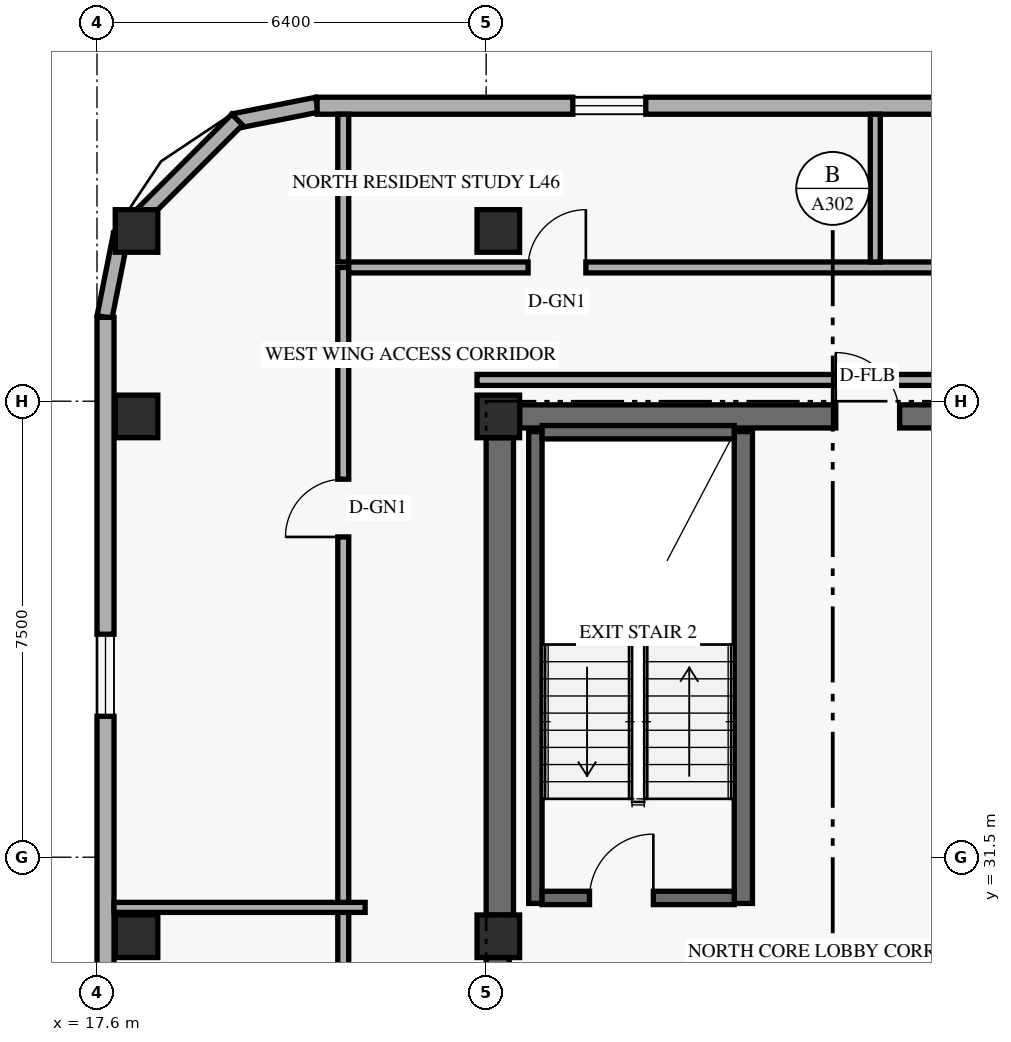
"""IFC4 building model, lengths in metres.
Left out: names, types, materials, properties, quantities, classifications, styles, units other than length and angle.
Written with IfcOpenShell. Run it as: python <this file> out.ifc"""

import sys

from ifc_helpers import new_model, si_unit, direction, frame, frame_2d, origin, origin_2d, place, context, subcontext, project, spatial, rectangle, extrude, element, fill, save


model = new_model("IFC4")
c1 = context("Model", 3, precision=1e-05, world=origin(), true_north=direction((0.0, 1.0)))
c2 = subcontext(c1, "Body", "Model", "MODEL_VIEW")
j1 = project(units=[si_unit("LENGTHUNIT", "METRE"), si_unit("PLANEANGLEUNIT", "RADIAN")], contexts=[c1])
p1 = place(None, origin())
s1 = spatial("IfcSite", under=j1, at=p1, CompositionType="ELEMENT")
p2 = place(p1, origin())
s2 = spatial("IfcBuilding", under=s1, at=p2, CompositionType="ELEMENT")
p3 = place(p2, frame((0.0, 0.0, 177.6)))
s3 = spatial("IfcBuildingStorey", under=s2, at=p3, CompositionType="ELEMENT", Elevation=177.6)
p4 = place(p3, frame((24.19, 17.9, 0.0), z_axis=(0.0, 0.0, 1.0), x_axis=(0.0, 1.0, 0.0)))
e1 = element("IfcWall", 1, at=p4, inside=s3, PredefinedType="SHEAR", context=c2, shape_type="SweptSolid", body=[
    extrude(rectangle(XDim=11.95, YDim=0.38, at=frame_2d((5.975, 0.0))), origin(), (0.0, 0.0, 1.0), 2.748),
])
p5 = place(p3, frame((24.225, 30.55, 0.0), z_axis=(0.0, 0.0, 1.0), x_axis=(0.0, 1.0, 0.0)))
e2 = element("IfcWall", 2, at=p5, inside=s3, PredefinedType="SHEAR", context=c2, shape_type="SweptSolid", body=[
    extrude(rectangle(XDim=7.85, YDim=0.45, at=frame_2d((3.925, 0.0))), origin(), (0.0, 0.0, 1.0), 2.748),
])
p6 = place(p3, frame((24.55, 38.75, 0.0), z_axis=(0.0, 0.0, 1.0), x_axis=(1.0, 0.0, 0.0)))
e3 = element("IfcWall", 3, at=p6, inside=s3, PredefinedType="SHEAR", context=c2, shape_type="SweptSolid", body=[
    extrude(rectangle(XDim=10.3, YDim=0.38, at=frame_2d((5.15, 0.0))), origin(), (0.0, 0.0, 1.0), 3.36),
])
p7 = place(p6, frame((5.2, 0.0, 0.0)))
e4 = element("IfcOpeningElement", 4, at=p7, cuts=e3, PredefinedType="OPENING", context=c2, shape_type="SweptSolid", body=[
    extrude(rectangle(XDim=1.05, YDim=2.15, at=frame_2d((0.525, 1.075))), frame((0.0, 0.2, 0.0), z_axis=(0.0, -1.0, 0.0), x_axis=(1.0, 0.0, 0.0)), (0.0, 0.0, 1.0), 0.4),
])
p8 = place(p3, frame((24.81, 30.74, 0.0), z_axis=(0.0, 0.0, 1.0), x_axis=(0.0, 1.0, 0.0)))
e5 = element("IfcWall", 5, at=p8, inside=s3, PredefinedType="SHEAR", context=c2, shape_type="SweptSolid", body=[
    extrude(rectangle(XDim=7.76, YDim=0.22, at=frame_2d((3.88, 0.0))), origin(), (0.0, 0.0, 1.0), 3.36),
])
p9 = place(p3, frame((28.23, 30.74, 0.0), z_axis=(0.0, 0.0, 1.0), x_axis=(0.0, 1.0, 0.0)))
e6 = element("IfcWall", 6, at=p9, inside=s3, PredefinedType="SHEAR", context=c2, shape_type="SweptSolid", body=[
    extrude(rectangle(XDim=7.76, YDim=0.3, at=frame_2d((3.88, 0.0))), origin(), (0.0, 0.0, 1.0), 3.36),
])
p10 = place(p3, frame((24.92, 30.83, 0.0), z_axis=(0.0, 0.0, 1.0), x_axis=(1.0, 0.0, 0.0)))
e7 = element("IfcWall", 7, at=p10, inside=s3, PredefinedType="SHEAR", context=c2, shape_type="SweptSolid", body=[
    extrude(rectangle(XDim=3.16, YDim=0.22, at=frame_2d((1.58, 0.0))), origin(), (0.0, 0.0, 1.0), 3.36),
])
p11 = place(p10, frame((0.78, 0.0, 0.0)))
e8 = element("IfcOpeningElement", 8, at=p11, cuts=e7, PredefinedType="OPENING", context=c2, shape_type="SweptSolid", body=[
    extrude(rectangle(XDim=1.05, YDim=2.15, at=frame_2d((0.525, 1.075))), frame((0.0, 0.12, 0.0), z_axis=(0.0, -1.0, 0.0), x_axis=(1.0, 0.0, 0.0)), (0.0, 0.0, 1.0), 0.24),
])
p12 = place(p3, frame((24.92, 38.49, 0.0), z_axis=(0.0, 0.0, 1.0), x_axis=(1.0, 0.0, 0.0)))
e9 = element("IfcWall", 9, at=p12, inside=s3, PredefinedType="SHEAR", context=c2, shape_type="SweptSolid", body=[
    extrude(rectangle(XDim=3.16, YDim=0.22, at=frame_2d((1.58, 0.0))), origin(), (0.0, 0.0, 1.0), 3.36),
])
for number, where, z_axis, x_axis in (
    (10, (18.25, 30.2, 0.0), (0.0, 0.0, 1.0), (1.0, 0.0, 0.0)),
    (11, (18.25, 38.75, 0.0), (0.0, 0.0, 1.0), (1.0, 0.0, 0.0)),
    (12, (18.25, 41.8, 0.0), (0.0, 0.0, 1.0), (1.0, 0.0, 0.0)),
    (13, (24.2, 30.2, 0.0), (0.0, 0.0, 1.0), (1.0, 0.0, 0.0)),
    (14, (24.2, 38.75, 0.0), (0.0, 0.0, 1.0), (1.0, 0.0, 0.0)),
    (15, (24.2, 41.8, 0.0), (0.0, 0.0, 1.0), (1.0, 0.0, 0.0)),
):
    element("IfcColumn", number, at=place(p3, frame(where, z_axis=z_axis, x_axis=x_axis)), inside=s3, PredefinedType="COLUMN", context=c2, shape_type="SweptSolid", body=[
        extrude(rectangle(XDim=0.7, YDim=0.7, at=origin_2d()), origin(), (0.0, 0.0, 1.0), 3.6),
    ])
p13 = place(p3, frame((21.217, 43.876, 0.0), z_axis=(0.0, 0.0, 1.0), x_axis=(-0.980809899341, -0.19496651342, 0.0)))
e16 = element("IfcWall", 16, at=p13, inside=s3, PredefinedType="SOLIDWALL", context=c2, shape_type="SweptSolid", body=[
    extrude(rectangle(XDim=1.389, YDim=0.25, at=frame_2d((0.694, 0.0))), origin(), (0.0, 0.0, 1.0), 3.36),
])
p14 = place(p3, frame((19.905, 43.632, 0.0), z_axis=(0.0, 0.0, 1.0), x_axis=(-0.707106781187, -0.707106781187, 0.0)))
e17 = element("IfcWall", 17, at=p14, inside=s3, PredefinedType="SOLIDWALL", context=c2, shape_type="SweptSolid", body=[
    extrude(rectangle(XDim=2.739, YDim=0.25, at=frame_2d((1.37, 0.0))), origin(), (0.0, 0.0, 1.0), 3.36),
])
p15 = place(p3, frame((17.995, 41.746, 0.0), z_axis=(0.0, 0.0, 1.0), x_axis=(-0.195135625965, -0.9807762678, 0.0)))
e18 = element("IfcWall", 18, at=p15, inside=s3, PredefinedType="SOLIDWALL", context=c2, shape_type="SweptSolid", body=[
    extrude(rectangle(XDim=1.389, YDim=0.25, at=frame_2d((0.694, 0.0))), origin(), (0.0, 0.0, 1.0), 3.36),
])
p16 = place(p3, frame((54.98, 43.86, 0.0), z_axis=(0.0, 0.0, 1.0), x_axis=(-1.0, 0.0, 0.0)))
e19 = element("IfcWall", 19, at=p16, inside=s3, PredefinedType="SOLIDWALL", context=c2, shape_type="SweptSolid", body=[
    extrude(rectangle(XDim=33.76, YDim=0.28, at=frame_2d((16.88, 0.0))), origin(), (0.0, 0.0, 1.0), 3.36),
])
p17 = place(p16, frame((28.355, 0.0, 0.85)))
e20 = element("IfcOpeningElement", 20, at=p17, cuts=e19, PredefinedType="OPENING", context=c2, shape_type="SweptSolid", body=[
    extrude(rectangle(XDim=1.2, YDim=1.5, at=frame_2d((0.6, 0.75))), frame((0.0, 0.15, 0.0), z_axis=(0.0, -1.0, 0.0), x_axis=(1.0, 0.0, 0.0)), (0.0, 0.0, 1.0), 0.3),
])
p18 = place(p16, frame((21.47, 0.0, 0.85)))
e21 = element("IfcOpeningElement", 21, at=p18, cuts=e19, PredefinedType="OPENING", context=c2, shape_type="SweptSolid", body=[
    extrude(rectangle(XDim=1.2, YDim=1.5, at=frame_2d((0.6, 0.75))), frame((0.0, 0.15, 0.0), z_axis=(0.0, -1.0, 0.0), x_axis=(1.0, 0.0, 0.0)), (0.0, 0.0, 1.0), 0.3),
])
p19 = place(p16, frame((17.74, 0.0, 0.85)))
e22 = element("IfcOpeningElement", 22, at=p19, cuts=e19, PredefinedType="OPENING", context=c2, shape_type="SweptSolid", body=[
    extrude(rectangle(XDim=1.2, YDim=1.5, at=frame_2d((0.6, 0.75))), frame((0.0, 0.15, 0.0), z_axis=(0.0, -1.0, 0.0), x_axis=(1.0, 0.0, 0.0)), (0.0, 0.0, 1.0), 0.3),
])
p20 = place(p16, frame((13.62, 0.0, 0.85)))
e23 = element("IfcOpeningElement", 23, at=p20, cuts=e19, PredefinedType="OPENING", context=c2, shape_type="SweptSolid", body=[
    extrude(rectangle(XDim=1.2, YDim=1.5, at=frame_2d((0.6, 0.75))), frame((0.0, 0.15, 0.0), z_axis=(0.0, -1.0, 0.0), x_axis=(1.0, 0.0, 0.0)), (0.0, 0.0, 1.0), 0.3),
])
p21 = place(p16, frame((8.65, 0.0, 0.85)))
e24 = element("IfcOpeningElement", 24, at=p21, cuts=e19, PredefinedType="OPENING", context=c2, shape_type="SweptSolid", body=[
    extrude(rectangle(XDim=1.2, YDim=1.5, at=frame_2d((0.6, 0.75))), frame((0.0, 0.15, 0.0), z_axis=(0.0, -1.0, 0.0), x_axis=(1.0, 0.0, 0.0)), (0.0, 0.0, 1.0), 0.3),
])
p22 = place(p16, frame((5.68, 0.0, 0.85)))
e25 = element("IfcOpeningElement", 25, at=p22, cuts=e19, PredefinedType="OPENING", context=c2, shape_type="SweptSolid", body=[
    extrude(rectangle(XDim=1.2, YDim=1.5, at=frame_2d((0.6, 0.75))), frame((0.0, 0.15, 0.0), z_axis=(0.0, -1.0, 0.0), x_axis=(1.0, 0.0, 0.0)), (0.0, 0.0, 1.0), 0.3),
])
p23 = place(p16, frame((2.09, 0.0, 0.85)))
e26 = element("IfcOpeningElement", 26, at=p23, cuts=e19, PredefinedType="OPENING", context=c2, shape_type="SweptSolid", body=[
    extrude(rectangle(XDim=1.2, YDim=1.5, at=frame_2d((0.6, 0.75))), frame((0.0, 0.15, 0.0), z_axis=(0.0, -1.0, 0.0), x_axis=(1.0, 0.0, 0.0)), (0.0, 0.0, 1.0), 0.3),
])
p24 = place(p3, frame((17.74, 40.38, 0.0), z_axis=(0.0, 0.0, 1.0), x_axis=(0.0, -1.0, 0.0)))
e27 = element("IfcWall", 27, at=p24, inside=s3, PredefinedType="SOLIDWALL", context=c2, shape_type="SweptSolid", body=[
    extrude(rectangle(XDim=32.76, YDim=0.28, at=frame_2d((16.38, 0.0))), origin(), (0.0, 0.0, 1.0), 3.36),
])
p25 = place(p24, frame((28.998, 0.0, 0.85)))
e28 = element("IfcOpeningElement", 28, at=p25, cuts=e27, PredefinedType="OPENING", context=c2, shape_type="SweptSolid", body=[
    extrude(rectangle(XDim=1.35, YDim=1.55, at=frame_2d((0.675, 0.775))), frame((0.0, 0.15, 0.0), z_axis=(0.0, -1.0, 0.0), x_axis=(1.0, 0.0, 0.0)), (0.0, 0.0, 1.0), 0.3),
])
p26 = place(p24, frame((25.288, 0.0, 0.85)))
e29 = element("IfcOpeningElement", 29, at=p26, cuts=e27, PredefinedType="OPENING", context=c2, shape_type="SweptSolid", body=[
    extrude(rectangle(XDim=1.35, YDim=1.55, at=frame_2d((0.675, 0.775))), frame((0.0, 0.15, 0.0), z_axis=(0.0, -1.0, 0.0), x_axis=(1.0, 0.0, 0.0)), (0.0, 0.0, 1.0), 0.3),
])
p27 = place(p24, frame((15.625, 0.0, 0.85)))
e30 = element("IfcOpeningElement", 30, at=p27, cuts=e27, PredefinedType="OPENING", context=c2, shape_type="SweptSolid", body=[
    extrude(rectangle(XDim=1.35, YDim=1.55, at=frame_2d((0.675, 0.775))), frame((0.0, 0.15, 0.0), z_axis=(0.0, -1.0, 0.0), x_axis=(1.0, 0.0, 0.0)), (0.0, 0.0, 1.0), 0.3),
])
p28 = place(p24, frame((5.212, 0.0, 0.85)))
e31 = element("IfcOpeningElement", 31, at=p28, cuts=e27, PredefinedType="OPENING", context=c2, shape_type="SweptSolid", body=[
    extrude(rectangle(XDim=1.35, YDim=1.55, at=frame_2d((0.675, 0.775))), frame((0.0, 0.15, 0.0), z_axis=(0.0, -1.0, 0.0), x_axis=(1.0, 0.0, 0.0)), (0.0, 0.0, 1.0), 0.3),
])
p29 = place(p3, frame((21.65, 6.8, 0.0), z_axis=(0.0, 0.0, 1.0), x_axis=(0.0, 1.0, 0.0)))
e32 = element("IfcWall", 32, at=p29, inside=s3, PredefinedType="STANDARD", context=c2, shape_type="SweptSolid", body=[
    extrude(rectangle(XDim=34.4, YDim=0.18, at=frame_2d((17.2, 0.0))), origin(), (0.0, 0.0, 1.0), 2.73),
])
p30 = place(p29, frame((0.732, 0.0, 0.0)))
e33 = element("IfcOpeningElement", 33, at=p30, cuts=e32, PredefinedType="OPENING", context=c2, shape_type="SweptSolid", body=[
    extrude(rectangle(XDim=0.95, YDim=2.15, at=frame_2d((0.475, 1.075))), frame((0.0, 0.1, 0.0), z_axis=(0.0, -1.0, 0.0), x_axis=(1.0, 0.0, 0.0)), (0.0, 0.0, 1.0), 0.2),
])
p31 = place(p29, frame((7.768, 0.0, 0.0)))
e34 = element("IfcOpeningElement", 34, at=p31, cuts=e32, PredefinedType="OPENING", context=c2, shape_type="SweptSolid", body=[
    extrude(rectangle(XDim=0.95, YDim=2.15, at=frame_2d((0.475, 1.075))), frame((0.0, 0.1, 0.0), z_axis=(0.0, -1.0, 0.0), x_axis=(1.0, 0.0, 0.0)), (0.0, 0.0, 1.0), 0.2),
])
p32 = place(p29, frame((17.333, 0.0, 0.0)))
e35 = element("IfcOpeningElement", 35, at=p32, cuts=e32, PredefinedType="OPENING", context=c2, shape_type="SweptSolid", body=[
    extrude(rectangle(XDim=0.95, YDim=2.15, at=frame_2d((0.475, 1.075))), frame((0.0, 0.1, 0.0), z_axis=(0.0, -1.0, 0.0), x_axis=(1.0, 0.0, 0.0)), (0.0, 0.0, 1.0), 0.2),
])
p33 = place(p29, frame((29.968, 0.0, 0.0)))
e36 = element("IfcOpeningElement", 36, at=p33, cuts=e32, PredefinedType="OPENING", context=c2, shape_type="SweptSolid", body=[
    extrude(rectangle(XDim=0.95, YDim=2.15, at=frame_2d((0.475, 1.075))), frame((0.0, 0.1, 0.0), z_axis=(0.0, -1.0, 0.0), x_axis=(1.0, 0.0, 0.0)), (0.0, 0.0, 1.0), 0.2),
])
p34 = place(p3, frame((21.74, 41.2, 0.0), z_axis=(0.0, 0.0, 1.0), x_axis=(1.0, 0.0, 0.0)))
e37 = element("IfcWall", 37, at=p34, inside=s3, PredefinedType="STANDARD", context=c2, shape_type="SweptSolid", body=[
    extrude(rectangle(XDim=13.68, YDim=0.18, at=frame_2d((6.84, 0.0))), origin(), (0.0, 0.0, 1.0), 2.73),
])
p35 = place(p34, frame((2.95, 0.0, 0.0)))
e38 = element("IfcOpeningElement", 38, at=p35, cuts=e37, PredefinedType="OPENING", context=c2, shape_type="SweptSolid", body=[
    extrude(rectangle(XDim=0.95, YDim=2.15, at=frame_2d((0.475, 1.075))), frame((0.0, 0.1, 0.0), z_axis=(0.0, -1.0, 0.0), x_axis=(1.0, 0.0, 0.0)), (0.0, 0.0, 1.0), 0.2),
])
p36 = place(p34, frame((10.11, 0.0, 0.0)))
e39 = element("IfcOpeningElement", 39, at=p36, cuts=e37, PredefinedType="OPENING", context=c2, shape_type="SweptSolid", body=[
    extrude(rectangle(XDim=0.95, YDim=2.15, at=frame_2d((0.475, 1.075))), frame((0.0, 0.1, 0.0), z_axis=(0.0, -1.0, 0.0), x_axis=(1.0, 0.0, 0.0)), (0.0, 0.0, 1.0), 0.2),
])
p37 = place(p3, frame((23.85, 39.35, 0.0), z_axis=(0.0, 0.0, 1.0), x_axis=(1.0, 0.0, 0.0)))
e40 = element("IfcWall", 40, at=p37, inside=s3, PredefinedType="STANDARD", context=c2, shape_type="SweptSolid", body=[
    extrude(rectangle(XDim=11.57, YDim=0.18, at=frame_2d((5.785, 0.0))), origin(), (0.0, 0.0, 1.0), 2.73),
])
p38 = place(p3, frame((21.65, 41.29, 0.0), z_axis=(0.0, 0.0, 1.0), x_axis=(0.0, 1.0, 0.0)))
e41 = element("IfcWall", 41, at=p38, inside=s3, PredefinedType="PARTITIONING", context=c2, shape_type="SweptSolid", body=[
    extrude(rectangle(XDim=2.43, YDim=0.18, at=frame_2d((1.215, 0.0))), origin(), (0.0, 0.0, 1.0), 2.879),
])
p39 = place(p3, frame((17.88, 30.675, 0.0), z_axis=(0.0, 0.0, 1.0), x_axis=(1.0, 0.0, 0.0)))
e42 = element("IfcWall", 42, at=p39, inside=s3, PredefinedType="PARTITIONING", context=c2, shape_type="SweptSolid", body=[
    extrude(rectangle(XDim=4.13, YDim=0.165, at=frame_2d((2.065, 0.0))), origin(), (0.0, 0.0, 1.0), 2.879),
])
p40 = place(p3, frame((30.4, 41.29, 0.0), z_axis=(0.0, 0.0, 1.0), x_axis=(0.0, 1.0, 0.0)))
e43 = element("IfcWall", 43, at=p40, inside=s3, PredefinedType="PARTITIONING", context=c2, shape_type="SweptSolid", body=[
    extrude(rectangle(XDim=2.43, YDim=0.165, at=frame_2d((1.215, 0.0))), origin(), (0.0, 0.0, 1.0), 2.879),
])
p41 = place(p17, origin())
e44 = element("IfcWindow", 44, at=p41, inside=s3, PartitioningType="SINGLE_PANEL", PredefinedType="WINDOW", context=c2, shape_type="SweptSolid", body=[
    extrude(rectangle(XDim=1.2, YDim=1.5, at=frame_2d((0.6, 0.75))), frame((0.0, 0.03, 0.0), z_axis=(0.0, -1.0, 0.0), x_axis=(1.0, 0.0, 0.0)), (0.0, 0.0, 1.0), 0.06),
])
fill(e20, e44)
p42 = place(p28, origin())
e45 = element("IfcWindow", 45, at=p42, inside=s3, PartitioningType="SINGLE_PANEL", PredefinedType="WINDOW", context=c2, shape_type="SweptSolid", body=[
    extrude(rectangle(XDim=1.35, YDim=1.55, at=frame_2d((0.675, 0.775))), frame((0.0, 0.03, 0.0), z_axis=(0.0, -1.0, 0.0), x_axis=(1.0, 0.0, 0.0)), (0.0, 0.0, 1.0), 0.06),
])
fill(e31, e45)
p43 = place(p11, origin())
e46 = element("IfcDoor", 46, at=p43, inside=s3, OperationType="SINGLE_SWING_RIGHT", PredefinedType="DOOR", context=c2, shape_type="SweptSolid", body=[
    extrude(rectangle(XDim=1.05, YDim=2.15, at=frame_2d((0.525, 1.075))), frame((0.0, 0.025, 0.0), z_axis=(0.0, -1.0, 0.0), x_axis=(1.0, 0.0, 0.0)), (0.0, 0.0, 1.0), 0.05),
])
fill(e8, e46)
p44 = place(p7, frame((1.05, 0.0, 0.0), z_axis=(0.0, 0.0, 1.0), x_axis=(-1.0, 0.0, 0.0)))
e47 = element("IfcDoor", 47, at=p44, inside=s3, OperationType="SINGLE_SWING_RIGHT", PredefinedType="DOOR", context=c2, shape_type="SweptSolid", body=[
    extrude(rectangle(XDim=1.05, YDim=2.15, at=frame_2d((0.525, 1.075))), frame((0.0, 0.025, 0.0), z_axis=(0.0, -1.0, 0.0), x_axis=(1.0, 0.0, 0.0)), (0.0, 0.0, 1.0), 0.05),
])
fill(e4, e47)
p45 = place(p33, origin())
e48 = element("IfcDoor", 48, at=p45, inside=s3, OperationType="SINGLE_SWING_LEFT", PredefinedType="DOOR", context=c2, shape_type="SweptSolid", body=[
    extrude(rectangle(XDim=0.95, YDim=2.15, at=frame_2d((0.475, 1.075))), frame((0.0, 0.025, 0.0), z_axis=(0.0, -1.0, 0.0), x_axis=(1.0, 0.0, 0.0)), (0.0, 0.0, 1.0), 0.05),
])
fill(e36, e48)
p46 = place(p35, origin())
e49 = element("IfcDoor", 49, at=p46, inside=s3, OperationType="SINGLE_SWING_RIGHT", PredefinedType="DOOR", context=c2, shape_type="SweptSolid", body=[
    extrude(rectangle(XDim=0.95, YDim=2.15, at=frame_2d((0.475, 1.075))), frame((0.0, 0.025, 0.0), z_axis=(0.0, -1.0, 0.0), x_axis=(1.0, 0.0, 0.0)), (0.0, 0.0, 1.0), 0.05),
])
fill(e38, e49)
save(model, sys.argv[1])
